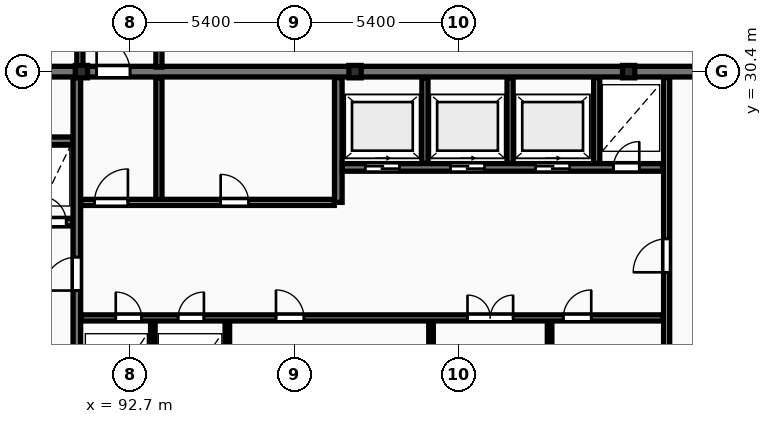
"""IFC4 building model, lengths in metres.
Left out: names, types, materials, properties, quantities, classifications, styles, units other than length and angle.
Written with IfcOpenShell. Run it as: python <this file> out.ifc"""

import sys

from ifc_helpers import new_model, si_unit, direction, frame, frame_2d, origin, origin_2d, place, context, subcontext, project, spatial, rectangle, i_section, extrude, element, fill, save


model = new_model("IFC4")
c1 = context("Model", 3, precision=1e-05, world=origin(), true_north=direction((0.0, 1.0)))
c2 = subcontext(c1, "Body", "Model", "MODEL_VIEW")
j1 = project(units=[si_unit("LENGTHUNIT", "METRE"), si_unit("PLANEANGLEUNIT", "RADIAN")], contexts=[c1])
p1 = place(None, origin())
s1 = spatial("IfcSite", under=j1, at=p1, CompositionType="ELEMENT")
p2 = place(p1, origin())
s2 = spatial("IfcBuilding", under=s1, at=p2, CompositionType="ELEMENT")
p3 = place(p2, frame((0.0, 0.0, 153.7)))
s3 = spatial("IfcBuildingStorey", under=s2, at=p3, CompositionType="ELEMENT", Elevation=153.7)
for number, where, z_axis, x_axis in (
    (1, (91.1, 30.4, 0.0), (0.0, 0.0, 1.0), (1.0, 0.0, 0.0)),
    (2, (100.1, 30.4, 0.0), (0.0, 0.0, 1.0), (1.0, 0.0, 0.0)),
    (3, (109.1, 30.4, 0.0), (0.0, 0.0, 1.0), (1.0, 0.0, 0.0)),
):
    element("IfcColumn", number, at=place(p3, frame(where, z_axis=z_axis, x_axis=x_axis)), inside=s3, PredefinedType="COLUMN", context=c2, shape_type="SweptSolid", body=[
        extrude(i_section(OverallWidth=0.403, OverallDepth=0.406, WebThickness=0.027, FlangeThickness=0.043, FilletRadius=0.015, at=origin_2d()), origin(), (0.0, 0.0, 1.0), 3.6),
    ])
p4 = place(p3, frame((81.925, 30.4, 0.0), z_axis=(0.0, 0.0, 1.0), x_axis=(1.0, 0.0, 0.0)))
e4 = element("IfcWall", 4, at=p4, inside=s3, PredefinedType="SHEAR", context=c2, shape_type="SweptSolid", body=[
    extrude(rectangle(XDim=36.265, YDim=0.35, at=frame_2d((18.132, 0.0))), origin(), (0.0, 0.0, 1.0), 3.6),
])
p5 = place(p4, frame((9.675, 0.0, 0.0)))
e5 = element("IfcOpeningElement", 5, at=p5, cuts=e4, PredefinedType="OPENING", context=c2, shape_type="SweptSolid", body=[
    extrude(rectangle(XDim=1.1, YDim=2.1, at=frame_2d((0.55, 1.05))), frame((0.0, 0.185, 0.0), z_axis=(0.0, -1.0, 0.0), x_axis=(1.0, 0.0, 0.0)), (0.0, 0.0, 1.0), 0.37),
])
p6 = place(p3, frame((83.0, 28.125, 0.0), z_axis=(0.0, 0.0, 1.0), x_axis=(1.0, 0.0, 0.0)))
e6 = element("IfcWall", 6, at=p6, inside=s3, PredefinedType="SHEAR", context=c2, shape_type="SweptSolid", body=[
    extrude(rectangle(XDim=7.82, YDim=0.25, at=frame_2d((3.91, 0.0))), origin(), (0.0, 0.0, 1.0), 3.6),
])
p7 = place(p3, frame((86.5, 25.45, 0.0), z_axis=(0.0, 0.0, 1.0), x_axis=(1.0, 0.0, 0.0)))
e7 = element("IfcWall", 7, at=p7, inside=s3, PredefinedType="SHEAR", context=c2, shape_type="SweptSolid", body=[
    extrude(rectangle(XDim=4.32, YDim=0.25, at=frame_2d((2.16, 0.0))), origin(), (0.0, 0.0, 1.0), 3.6),
])
p8 = place(p7, frame((1.14, 0.0, 0.0)))
e8 = element("IfcOpeningElement", 8, at=p8, cuts=e7, PredefinedType="OPENING", context=c2, shape_type="SweptSolid", body=[
    extrude(rectangle(XDim=1.12, YDim=2.12, at=frame_2d((0.56, 1.06))), frame((0.0, 0.135, 0.0), z_axis=(0.0, -1.0, 0.0), x_axis=(1.0, 0.0, 0.0)), (0.0, 0.0, 1.0), 0.27),
])
p9 = place(p7, frame((3.25, 0.0, 0.0)))
e9 = element("IfcOpeningElement", 9, at=p9, cuts=e7, PredefinedType="OPENING", context=c2, shape_type="SweptSolid", body=[
    extrude(rectangle(XDim=0.85, YDim=2.05, at=frame_2d((0.425, 1.025))), frame((0.0, 0.135, 0.0), z_axis=(0.0, -1.0, 0.0), x_axis=(1.0, 0.0, 0.0)), (0.0, 0.0, 1.0), 0.27),
])
p10 = place(p3, frame((90.95, 18.6, 0.0), z_axis=(0.0, 0.0, 1.0), x_axis=(0.0, 1.0, 0.0)))
e10 = element("IfcWall", 10, at=p10, inside=s3, PredefinedType="SHEAR", context=c2, shape_type="SweptSolid", body=[
    extrude(rectangle(XDim=11.6, YDim=0.25, at=frame_2d((5.8, 0.0))), origin(), (0.0, 0.0, 1.0), 3.6),
])
p11 = place(p10, frame((4.6, 0.0, 0.0)))
e11 = element("IfcOpeningElement", 11, at=p11, cuts=e10, PredefinedType="OPENING", context=c2, shape_type="SweptSolid", body=[
    extrude(rectangle(XDim=1.1, YDim=2.1, at=frame_2d((0.55, 1.05))), frame((0.0, 0.135, 0.0), z_axis=(0.0, -1.0, 0.0), x_axis=(1.0, 0.0, 0.0)), (0.0, 0.0, 1.0), 0.27),
])
p12 = place(p3, frame((93.65, 26.1, 0.0), z_axis=(0.0, 0.0, 1.0), x_axis=(0.0, 1.0, 0.0)))
e12 = element("IfcWall", 12, at=p12, inside=s3, PredefinedType="PARTITIONING", context=c2, shape_type="SweptSolid", body=[
    extrude(rectangle(XDim=4.1, YDim=0.2, at=frame_2d((2.05, 0.0))), origin(), (0.0, 0.0, 1.0), 3.32),
])
p13 = place(p3, frame((91.08, 26.1, 0.0), z_axis=(0.0, 0.0, 1.0), x_axis=(1.0, 0.0, 0.0)))
e13 = element("IfcWall", 13, at=p13, inside=s3, PredefinedType="PARTITIONING", context=c2, shape_type="SweptSolid", body=[
    extrude(rectangle(XDim=8.34, YDim=0.2, at=frame_2d((4.17, 0.0))), origin(), (0.0, 0.0, 1.0), 3.32),
])
p14 = place(p13, frame((0.45, 0.0, 0.0)))
e14 = element("IfcOpeningElement", 14, at=p14, cuts=e13, PredefinedType="OPENING", context=c2, shape_type="SweptSolid", body=[
    extrude(rectangle(XDim=1.1, YDim=2.1, at=frame_2d((0.55, 1.05))), frame((0.0, 0.11, 0.0), z_axis=(0.0, -1.0, 0.0), x_axis=(1.0, 0.0, 0.0)), (0.0, 0.0, 1.0), 0.22),
])
p15 = place(p13, frame((4.6, 0.0, 0.0)))
e15 = element("IfcOpeningElement", 15, at=p15, cuts=e13, PredefinedType="OPENING", context=c2, shape_type="SweptSolid", body=[
    extrude(rectangle(XDim=0.92, YDim=2.08, at=frame_2d((0.46, 1.04))), frame((0.0, 0.11, 0.0), z_axis=(0.0, -1.0, 0.0), x_axis=(1.0, 0.0, 0.0)), (0.0, 0.0, 1.0), 0.22),
])
p16 = place(p3, frame((99.55, 26.1, 0.0), z_axis=(0.0, 0.0, 1.0), x_axis=(0.0, 1.0, 0.0)))
e16 = element("IfcWall", 16, at=p16, inside=s3, PredefinedType="SHEAR", context=c2, shape_type="SweptSolid", body=[
    extrude(rectangle(XDim=4.1, YDim=0.25, at=frame_2d((2.05, 0.0))), origin(), (0.0, 0.0, 1.0), 3.6),
])
for number, where, z_axis, x_axis in (
    (17, (102.4, 27.38, 0.0), (0.0, 0.0, 1.0), (0.0, 1.0, 0.0)),
    (18, (105.2, 27.38, 0.0), (0.0, 0.0, 1.0), (0.0, 1.0, 0.0)),
    (19, (108.05, 27.38, 0.0), (0.0, 0.0, 1.0), (0.0, 1.0, 0.0)),
):
    element("IfcWall", number, at=place(p3, frame(where, z_axis=z_axis, x_axis=x_axis)), inside=s3, PredefinedType="PARTITIONING", context=c2, shape_type="SweptSolid", body=[
        extrude(rectangle(XDim=2.82, YDim=0.2, at=frame_2d((1.41, 0.0))), origin(), (0.0, 0.0, 1.0), 3.32),
    ])
p17 = place(p3, frame((99.68, 27.25, 0.0), z_axis=(0.0, 0.0, 1.0), x_axis=(1.0, 0.0, 0.0)))
e20 = element("IfcWall", 20, at=p17, inside=s3, PredefinedType="SHEAR", context=c2, shape_type="SweptSolid", body=[
    extrude(rectangle(XDim=10.54, YDim=0.25, at=frame_2d((5.27, 0.0))), origin(), (0.0, 0.0, 1.0), 3.6),
])
p18 = place(p17, frame((0.76, 0.0, 0.0)))
e21 = element("IfcOpeningElement", 21, at=p18, cuts=e20, PredefinedType="OPENING", context=c2, shape_type="SweptSolid", body=[
    extrude(rectangle(XDim=1.12, YDim=2.12, at=frame_2d((0.56, 1.06))), frame((0.0, 0.135, 0.0), z_axis=(0.0, -1.0, 0.0), x_axis=(1.0, 0.0, 0.0)), (0.0, 0.0, 1.0), 0.27),
])
p19 = place(p17, frame((3.56, 0.0, 0.0)))
e22 = element("IfcOpeningElement", 22, at=p19, cuts=e20, PredefinedType="OPENING", context=c2, shape_type="SweptSolid", body=[
    extrude(rectangle(XDim=1.12, YDim=2.12, at=frame_2d((0.56, 1.06))), frame((0.0, 0.135, 0.0), z_axis=(0.0, -1.0, 0.0), x_axis=(1.0, 0.0, 0.0)), (0.0, 0.0, 1.0), 0.27),
])
p20 = place(p17, frame((6.36, 0.0, 0.0)))
e23 = element("IfcOpeningElement", 23, at=p20, cuts=e20, PredefinedType="OPENING", context=c2, shape_type="SweptSolid", body=[
    extrude(rectangle(XDim=1.12, YDim=2.12, at=frame_2d((0.56, 1.06))), frame((0.0, 0.135, 0.0), z_axis=(0.0, -1.0, 0.0), x_axis=(1.0, 0.0, 0.0)), (0.0, 0.0, 1.0), 0.27),
])
p21 = place(p17, frame((8.92, 0.0, 0.0)))
e24 = element("IfcOpeningElement", 24, at=p21, cuts=e20, PredefinedType="OPENING", context=c2, shape_type="SweptSolid", body=[
    extrude(rectangle(XDim=0.85, YDim=2.05, at=frame_2d((0.425, 1.025))), frame((0.0, 0.135, 0.0), z_axis=(0.0, -1.0, 0.0), x_axis=(1.0, 0.0, 0.0)), (0.0, 0.0, 1.0), 0.27),
])
for number, where, z_axis, x_axis in (
    (25, (93.45, 18.6, 0.0), (0.0, 0.0, 1.0), (0.0, 1.0, 0.0)),
    (26, (95.9, 18.6, 0.0), (0.0, 0.0, 1.0), (0.0, 1.0, 0.0)),
    (27, (102.6, 18.6, 0.0), (0.0, 0.0, 1.0), (0.0, 1.0, 0.0)),
    (28, (106.5, 18.6, 0.0), (0.0, 0.0, 1.0), (0.0, 1.0, 0.0)),
):
    element("IfcWall", number, at=place(p3, frame(where, z_axis=z_axis, x_axis=x_axis)), inside=s3, PredefinedType="PARTITIONING", context=c2, shape_type="SweptSolid", body=[
        extrude(rectangle(XDim=3.6, YDim=0.15, at=frame_2d((1.8, 0.0))), origin(), (0.0, 0.0, 1.0), 3.32),
    ])
p22 = place(p3, frame((91.08, 22.3, 0.0), z_axis=(0.0, 0.0, 1.0), x_axis=(1.0, 0.0, 0.0)))
e29 = element("IfcWall", 29, at=p22, inside=s3, PredefinedType="PARTITIONING", context=c2, shape_type="SweptSolid", body=[
    extrude(rectangle(XDim=19.14, YDim=0.2, at=frame_2d((9.57, 0.0))), origin(), (0.0, 0.0, 1.0), 3.32),
])
p23 = place(p22, frame((1.15, 0.0, 0.0)))
e30 = element("IfcOpeningElement", 30, at=p23, cuts=e29, PredefinedType="OPENING", context=c2, shape_type="SweptSolid", body=[
    extrude(rectangle(XDim=0.85, YDim=2.05, at=frame_2d((0.425, 1.025))), frame((0.0, 0.11, 0.0), z_axis=(0.0, -1.0, 0.0), x_axis=(1.0, 0.0, 0.0)), (0.0, 0.0, 1.0), 0.22),
])
p24 = place(p22, frame((3.2, 0.0, 0.0)))
e31 = element("IfcOpeningElement", 31, at=p24, cuts=e29, PredefinedType="OPENING", context=c2, shape_type="SweptSolid", body=[
    extrude(rectangle(XDim=0.85, YDim=2.05, at=frame_2d((0.425, 1.025))), frame((0.0, 0.11, 0.0), z_axis=(0.0, -1.0, 0.0), x_axis=(1.0, 0.0, 0.0)), (0.0, 0.0, 1.0), 0.22),
])
p25 = place(p22, frame((12.72, 0.0, 0.0)))
e32 = element("IfcOpeningElement", 32, at=p25, cuts=e29, PredefinedType="OPENING", context=c2, shape_type="SweptSolid", body=[
    extrude(rectangle(XDim=1.5, YDim=2.2, at=frame_2d((0.75, 1.1))), frame((0.0, 0.11, 0.0), z_axis=(0.0, -1.0, 0.0), x_axis=(1.0, 0.0, 0.0)), (0.0, 0.0, 1.0), 0.22),
])
p26 = place(p22, frame((6.42, 0.0, 0.0)))
e33 = element("IfcOpeningElement", 33, at=p26, cuts=e29, PredefinedType="OPENING", context=c2, shape_type="SweptSolid", body=[
    extrude(rectangle(XDim=0.92, YDim=2.08, at=frame_2d((0.46, 1.04))), frame((0.0, 0.11, 0.0), z_axis=(0.0, -1.0, 0.0), x_axis=(1.0, 0.0, 0.0)), (0.0, 0.0, 1.0), 0.22),
])
p27 = place(p22, frame((15.87, 0.0, 0.0)))
e34 = element("IfcOpeningElement", 34, at=p27, cuts=e29, PredefinedType="OPENING", context=c2, shape_type="SweptSolid", body=[
    extrude(rectangle(XDim=0.92, YDim=2.08, at=frame_2d((0.46, 1.04))), frame((0.0, 0.11, 0.0), z_axis=(0.0, -1.0, 0.0), x_axis=(1.0, 0.0, 0.0)), (0.0, 0.0, 1.0), 0.22),
])
p28 = place(p3, frame((110.35, 18.6, 0.0), z_axis=(0.0, 0.0, 1.0), x_axis=(0.0, 1.0, 0.0)))
e35 = element("IfcWall", 35, at=p28, inside=s3, PredefinedType="PARTITIONING", context=c2, shape_type="SweptSolid", body=[
    extrude(rectangle(XDim=11.6, YDim=0.2, at=frame_2d((5.8, 0.0))), origin(), (0.0, 0.0, 1.0), 3.32),
])
p29 = place(p28, frame((5.2, 0.0, 0.0)))
e36 = element("IfcOpeningElement", 36, at=p29, cuts=e35, PredefinedType="OPENING", context=c2, shape_type="SweptSolid", body=[
    extrude(rectangle(XDim=1.1, YDim=2.15, at=frame_2d((0.55, 1.075))), frame((0.0, 0.11, 0.0), z_axis=(0.0, -1.0, 0.0), x_axis=(1.0, 0.0, 0.0)), (0.0, 0.0, 1.0), 0.22),
])
p30 = place(p3, frame((91.05, 30.55, 0.0), z_axis=(0.0, 0.0, 1.0), x_axis=(0.0, 1.0, 0.0)))
e37 = element("IfcWall", 37, at=p30, inside=s3, PredefinedType="PARTITIONING", context=c2, shape_type="SweptSolid", body=[
    extrude(rectangle(XDim=2.2, YDim=0.2, at=frame_2d((1.1, 0.0))), origin(), (0.0, 0.0, 1.0), 3.32),
])
p31 = place(p3, frame((93.65, 30.55, 0.0), z_axis=(0.0, 0.0, 1.0), x_axis=(0.0, 1.0, 0.0)))
e38 = element("IfcWall", 38, at=p31, inside=s3, PredefinedType="PARTITIONING", context=c2, shape_type="SweptSolid", body=[
    extrude(rectangle(XDim=2.2, YDim=0.2, at=frame_2d((1.1, 0.0))), origin(), (0.0, 0.0, 1.0), 2.394),
])
p32 = place(p5, origin())
e39 = element("IfcDoor", 39, at=p32, inside=s3, OperationType="SINGLE_SWING_LEFT", PredefinedType="DOOR", context=c2, shape_type="SweptSolid", body=[
    extrude(rectangle(XDim=1.1, YDim=2.1, at=frame_2d((0.55, 1.05))), frame((0.0, 0.025, 0.0), z_axis=(0.0, -1.0, 0.0), x_axis=(1.0, 0.0, 0.0)), (0.0, 0.0, 1.0), 0.05),
])
fill(e5, e39)
p33 = place(p9, origin())
e40 = element("IfcDoor", 40, at=p33, inside=s3, OperationType="SINGLE_SWING_LEFT", PredefinedType="DOOR", context=c2, shape_type="SweptSolid", body=[
    extrude(rectangle(XDim=0.85, YDim=2.05, at=frame_2d((0.425, 1.025))), frame((0.0, 0.025, 0.0), z_axis=(0.0, -1.0, 0.0), x_axis=(1.0, 0.0, 0.0)), (0.0, 0.0, 1.0), 0.05),
])
fill(e9, e40)
p34 = place(p11, origin())
e41 = element("IfcDoor", 41, at=p34, inside=s3, OperationType="SINGLE_SWING_LEFT", PredefinedType="DOOR", context=c2, shape_type="SweptSolid", body=[
    extrude(rectangle(XDim=1.1, YDim=2.1, at=frame_2d((0.55, 1.05))), frame((0.0, 0.025, 0.0), z_axis=(0.0, -1.0, 0.0), x_axis=(1.0, 0.0, 0.0)), (0.0, 0.0, 1.0), 0.05),
])
fill(e11, e41)
p35 = place(p14, origin())
e42 = element("IfcDoor", 42, at=p35, inside=s3, OperationType="SINGLE_SWING_RIGHT", PredefinedType="DOOR", context=c2, shape_type="SweptSolid", body=[
    extrude(rectangle(XDim=1.1, YDim=2.1, at=frame_2d((0.55, 1.05))), frame((0.0, 0.025, 0.0), z_axis=(0.0, -1.0, 0.0), x_axis=(1.0, 0.0, 0.0)), (0.0, 0.0, 1.0), 0.05),
])
fill(e14, e42)
p36 = place(p15, origin())
e43 = element("IfcDoor", 43, at=p36, inside=s3, OperationType="SINGLE_SWING_LEFT", PredefinedType="DOOR", context=c2, shape_type="SweptSolid", body=[
    extrude(rectangle(XDim=0.92, YDim=2.08, at=frame_2d((0.46, 1.04))), frame((0.0, 0.025, 0.0), z_axis=(0.0, -1.0, 0.0), x_axis=(1.0, 0.0, 0.0)), (0.0, 0.0, 1.0), 0.05),
])
fill(e15, e43)
p37 = place(p18, origin())
e44 = element("IfcDoor", 44, at=p37, inside=s3, OperationType="SLIDING_TO_RIGHT", PredefinedType="DOOR", context=c2, shape_type="SweptSolid", body=[
    extrude(rectangle(XDim=1.12, YDim=2.12, at=frame_2d((0.56, 1.06))), frame((0.0, 0.025, 0.0), z_axis=(0.0, -1.0, 0.0), x_axis=(1.0, 0.0, 0.0)), (0.0, 0.0, 1.0), 0.05),
])
fill(e21, e44)
p38 = place(p19, origin())
e45 = element("IfcDoor", 45, at=p38, inside=s3, OperationType="SLIDING_TO_RIGHT", PredefinedType="DOOR", context=c2, shape_type="SweptSolid", body=[
    extrude(rectangle(XDim=1.12, YDim=2.12, at=frame_2d((0.56, 1.06))), frame((0.0, 0.025, 0.0), z_axis=(0.0, -1.0, 0.0), x_axis=(1.0, 0.0, 0.0)), (0.0, 0.0, 1.0), 0.05),
])
fill(e22, e45)
p39 = place(p20, origin())
e46 = element("IfcDoor", 46, at=p39, inside=s3, OperationType="SLIDING_TO_RIGHT", PredefinedType="DOOR", context=c2, shape_type="SweptSolid", body=[
    extrude(rectangle(XDim=1.12, YDim=2.12, at=frame_2d((0.56, 1.06))), frame((0.0, 0.025, 0.0), z_axis=(0.0, -1.0, 0.0), x_axis=(1.0, 0.0, 0.0)), (0.0, 0.0, 1.0), 0.05),
])
fill(e23, e46)
p40 = place(p21, origin())
e47 = element("IfcDoor", 47, at=p40, inside=s3, OperationType="SINGLE_SWING_RIGHT", PredefinedType="DOOR", context=c2, shape_type="SweptSolid", body=[
    extrude(rectangle(XDim=0.85, YDim=2.05, at=frame_2d((0.425, 1.025))), frame((0.0, 0.025, 0.0), z_axis=(0.0, -1.0, 0.0), x_axis=(1.0, 0.0, 0.0)), (0.0, 0.0, 1.0), 0.05),
])
fill(e24, e47)
p41 = place(p23, origin())
e48 = element("IfcDoor", 48, at=p41, inside=s3, OperationType="SINGLE_SWING_LEFT", PredefinedType="DOOR", context=c2, shape_type="SweptSolid", body=[
    extrude(rectangle(XDim=0.85, YDim=2.05, at=frame_2d((0.425, 1.025))), frame((0.0, 0.025, 0.0), z_axis=(0.0, -1.0, 0.0), x_axis=(1.0, 0.0, 0.0)), (0.0, 0.0, 1.0), 0.05),
])
fill(e30, e48)
p42 = place(p24, origin())
e49 = element("IfcDoor", 49, at=p42, inside=s3, OperationType="SINGLE_SWING_RIGHT", PredefinedType="DOOR", context=c2, shape_type="SweptSolid", body=[
    extrude(rectangle(XDim=0.85, YDim=2.05, at=frame_2d((0.425, 1.025))), frame((0.0, 0.025, 0.0), z_axis=(0.0, -1.0, 0.0), x_axis=(1.0, 0.0, 0.0)), (0.0, 0.0, 1.0), 0.05),
])
fill(e31, e49)
p43 = place(p25, origin())
e50 = element("IfcDoor", 50, at=p43, inside=s3, OperationType="DOUBLE_DOOR_SINGLE_SWING", PredefinedType="DOOR", context=c2, shape_type="SweptSolid", body=[
    extrude(rectangle(XDim=1.5, YDim=2.2, at=frame_2d((0.75, 1.1))), frame((0.0, 0.025, 0.0), z_axis=(0.0, -1.0, 0.0), x_axis=(1.0, 0.0, 0.0)), (0.0, 0.0, 1.0), 0.05),
])
fill(e32, e50)
p44 = place(p26, origin())
e51 = element("IfcDoor", 51, at=p44, inside=s3, OperationType="SINGLE_SWING_LEFT", PredefinedType="DOOR", context=c2, shape_type="SweptSolid", body=[
    extrude(rectangle(XDim=0.92, YDim=2.08, at=frame_2d((0.46, 1.04))), frame((0.0, 0.025, 0.0), z_axis=(0.0, -1.0, 0.0), x_axis=(1.0, 0.0, 0.0)), (0.0, 0.0, 1.0), 0.05),
])
fill(e33, e51)
p45 = place(p27, origin())
e52 = element("IfcDoor", 52, at=p45, inside=s3, OperationType="SINGLE_SWING_RIGHT", PredefinedType="DOOR", context=c2, shape_type="SweptSolid", body=[
    extrude(rectangle(XDim=0.92, YDim=2.08, at=frame_2d((0.46, 1.04))), frame((0.0, 0.025, 0.0), z_axis=(0.0, -1.0, 0.0), x_axis=(1.0, 0.0, 0.0)), (0.0, 0.0, 1.0), 0.05),
])
fill(e34, e52)
p46 = place(p29, origin())
e53 = element("IfcDoor", 53, at=p46, inside=s3, OperationType="SINGLE_SWING_LEFT", PredefinedType="DOOR", context=c2, shape_type="SweptSolid", body=[
    extrude(rectangle(XDim=1.1, YDim=2.15, at=frame_2d((0.55, 1.075))), frame((0.0, 0.025, 0.0), z_axis=(0.0, -1.0, 0.0), x_axis=(1.0, 0.0, 0.0)), (0.0, 0.0, 1.0), 0.05),
])
fill(e36, e53)
save(model, sys.argv[1])
